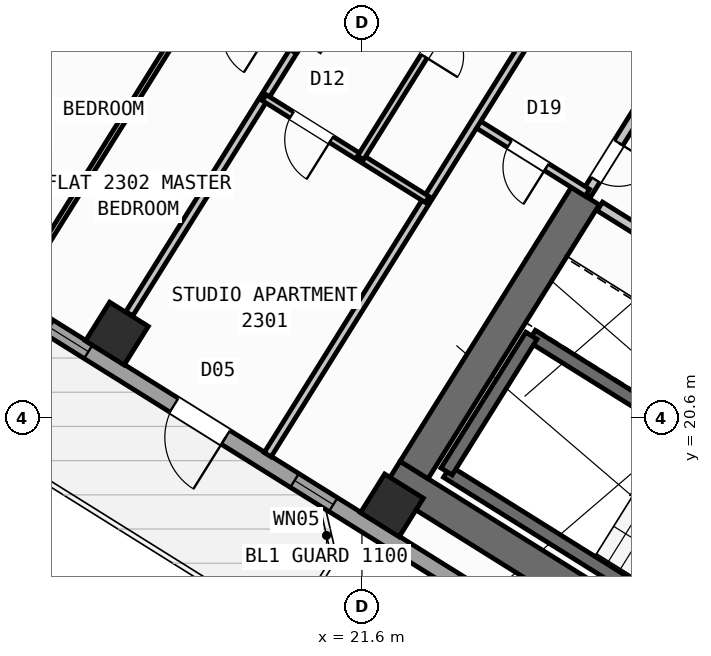
"""IFC4 building model, lengths in metres.
Left out: names, types, materials, properties, quantities, classifications, styles, units other than length and angle.
Written with IfcOpenShell. Run it as: python <this file> out.ifc"""

import sys

from ifc_helpers import new_model, si_unit, direction, frame, frame_2d, origin, origin_2d, place, context, subcontext, project, spatial, rectangle, hollow_rectangle, extrude, source, transform, mapped, element, fill, save


model = new_model("IFC4")
c1 = context("Model", 3, precision=1e-05, world=origin(), true_north=direction((0.0, 1.0)))
c2 = subcontext(c1, "Body", "Model", "MODEL_VIEW")
j1 = project(units=[si_unit("LENGTHUNIT", "METRE"), si_unit("PLANEANGLEUNIT", "RADIAN")], contexts=[c1])
p1 = place(None, origin())
s1 = spatial("IfcSite", under=j1, at=p1, CompositionType="ELEMENT")
p2 = place(p1, origin())
s2 = spatial("IfcBuilding", under=s1, at=p2, CompositionType="ELEMENT")
p3 = place(p2, frame((0.0, 0.0, 93.6)))
s3 = spatial("IfcBuildingStorey", under=s2, at=p3, CompositionType="ELEMENT", Elevation=93.6)
p4 = place(p3, frame((33.409, 12.45, 0.0), z_axis=(0.0, 0.0, 1.0), x_axis=(-0.848051132073, 0.529914405721, 0.0)))
e1 = element("IfcWall", 1, at=p4, inside=s3, PredefinedType="SHEAR", context=c2, shape_type="SweptSolid", body=[
    extrude(rectangle(XDim=13.24, YDim=0.65, at=frame_2d((6.62, 0.0))), origin(), (0.0, 0.0, 1.0), 3.35),
])
p5 = place(p3, frame((26.007, 24.976, 0.0), z_axis=(0.0, 0.0, 1.0), x_axis=(-0.529916319127, -0.848049936456, 0.0)))
e2 = element("IfcWall", 2, at=p5, inside=s3, PredefinedType="SHEAR", context=c2, shape_type="SweptSolid", body=[
    extrude(rectangle(XDim=6.375, YDim=0.65, at=frame_2d((3.188, 0.0))), origin(), (0.0, 0.0, 1.0), 3.35),
])
m1 = source(origin(), c2, "Body", "SweptSolid", [
    extrude(hollow_rectangle(XDim=0.9, YDim=0.9, WallThickness=0.036, at=origin_2d()), origin(), (0.0, 0.0, 1.0), 3.6),
])
for number, where, z_axis, x_axis in (
    (3, (22.191, 18.87, 0.0), (0.0, 0.0, 1.0), (-0.848, 0.53, 0.0)),
    (4, (16.764, 22.261, 0.0), (0.0, 0.0, 1.0), (-0.848, 0.53, 0.0)),
):
    element("IfcColumn", number, at=place(p3, frame(where, z_axis=z_axis, x_axis=x_axis)), inside=s3, PredefinedType="COLUMN", context=c2, shape_type="MappedRepresentation", body=[
        mapped(m1, transform((0.0, 0.0, 0.0), scale=1.0)),
    ])
p6 = place(p3, frame((31.76, 12.183, 0.0), z_axis=(0.0, 0.0, 1.0), x_axis=(-0.848047074256, 0.529920899612, 0.0)))
e5 = element("IfcWall", 5, at=p6, inside=s3, PredefinedType="STANDARD", context=c2, shape_type="SweptSolid", body=[
    extrude(rectangle(XDim=30.652, YDim=0.32, at=frame_2d((15.326, 0.0))), origin(), (0.0, 0.0, 1.0), 3.35),
])
p7 = place(p6, frame((15.153, 0.0, 0.0)))
e6 = element("IfcOpeningElement", 6, at=p7, cuts=e5, PredefinedType="OPENING", context=c2, shape_type="SweptSolid", body=[
    extrude(rectangle(XDim=1.2, YDim=2.15, at=frame_2d((0.6, 1.075))), frame((0.0, 0.17, 0.0), z_axis=(0.0, -1.0, 0.0), x_axis=(1.0, 0.0, 0.0)), (0.0, 0.0, 1.0), 0.34),
])
p8 = place(p6, frame((2.002, 0.0, 0.8)))
e7 = element("IfcOpeningElement", 7, at=p8, cuts=e5, PredefinedType="OPENING", context=c2, shape_type="SweptSolid", body=[
    extrude(rectangle(XDim=2.1, YDim=1.55, at=frame_2d((1.05, 0.775))), frame((0.0, 0.17, 0.0), z_axis=(0.0, -1.0, 0.0), x_axis=(1.0, 0.0, 0.0)), (0.0, 0.0, 1.0), 0.34),
])
p9 = place(p6, frame((7.206, 0.0, 0.8)))
e8 = element("IfcOpeningElement", 8, at=p9, cuts=e5, PredefinedType="OPENING", context=c2, shape_type="SweptSolid", body=[
    extrude(rectangle(XDim=2.1, YDim=1.55, at=frame_2d((1.05, 0.775))), frame((0.0, 0.17, 0.0), z_axis=(0.0, -1.0, 0.0), x_axis=(1.0, 0.0, 0.0)), (0.0, 0.0, 1.0), 0.34),
])
p10 = place(p6, frame((12.648, 0.0, 1.0)))
e9 = element("IfcOpeningElement", 9, at=p10, cuts=e5, PredefinedType="OPENING", context=c2, shape_type="SweptSolid", body=[
    extrude(rectangle(XDim=0.9, YDim=1.25, at=frame_2d((0.45, 0.625))), frame((0.0, 0.17, 0.0), z_axis=(0.0, -1.0, 0.0), x_axis=(1.0, 0.0, 0.0)), (0.0, 0.0, 1.0), 0.34),
])
p11 = place(p6, frame((27.974, 0.0, 0.95)))
e10 = element("IfcOpeningElement", 10, at=p11, cuts=e5, PredefinedType="OPENING", context=c2, shape_type="SweptSolid", body=[
    extrude(rectangle(XDim=1.2, YDim=1.4, at=frame_2d((0.6, 0.7))), frame((0.0, 0.17, 0.0), z_axis=(0.0, -1.0, 0.0), x_axis=(1.0, 0.0, 0.0)), (0.0, 0.0, 1.0), 0.34),
])
p12 = place(p6, frame((18.347, 0.0, 1.0)))
e11 = element("IfcOpeningElement", 11, at=p12, cuts=e5, PredefinedType="OPENING", context=c2, shape_type="SweptSolid", body=[
    extrude(rectangle(XDim=0.9, YDim=1.25, at=frame_2d((0.45, 0.625))), frame((0.0, 0.17, 0.0), z_axis=(0.0, -1.0, 0.0), x_axis=(1.0, 0.0, 0.0)), (0.0, 0.0, 1.0), 0.34),
])
p13 = place(p6, frame((20.931, 0.0, 1.0)))
e12 = element("IfcOpeningElement", 12, at=p13, cuts=e5, PredefinedType="OPENING", context=c2, shape_type="SweptSolid", body=[
    extrude(rectangle(XDim=0.65, YDim=1.15, at=frame_2d((0.325, 0.575))), frame((0.0, 0.17, 0.0), z_axis=(0.0, -1.0, 0.0), x_axis=(1.0, 0.0, 0.0)), (0.0, 0.0, 1.0), 0.34),
])
p14 = place(p6, frame((22.938, 0.0, 1.0)))
e13 = element("IfcOpeningElement", 13, at=p14, cuts=e5, PredefinedType="OPENING", context=c2, shape_type="SweptSolid", body=[
    extrude(rectangle(XDim=0.9, YDim=1.25, at=frame_2d((0.45, 0.625))), frame((0.0, 0.17, 0.0), z_axis=(0.0, -1.0, 0.0), x_axis=(1.0, 0.0, 0.0)), (0.0, 0.0, 1.0), 0.34),
])
p15 = place(p6, frame((25.069, 0.0, 1.0)))
e14 = element("IfcOpeningElement", 14, at=p15, cuts=e5, PredefinedType="OPENING", context=c2, shape_type="SweptSolid", body=[
    extrude(rectangle(XDim=0.9, YDim=1.25, at=frame_2d((0.45, 0.625))), frame((0.0, 0.17, 0.0), z_axis=(0.0, -1.0, 0.0), x_axis=(1.0, 0.0, 0.0)), (0.0, 0.0, 1.0), 0.34),
])
p16 = place(p3, frame((29.605, 15.581, 0.0), z_axis=(0.0, 0.0, 1.0), x_axis=(-0.848036911448, 0.529937163087, 0.0)))
e15 = element("IfcWall", 15, at=p16, inside=s3, PredefinedType="SHEAR", context=c2, shape_type="SweptSolid", body=[
    extrude(rectangle(XDim=7.46, YDim=0.26, at=frame_2d((3.73, 0.0))), origin(), (0.0, 0.0, 1.0), 3.35),
])
p17 = place(p3, frame((31.28, 18.261, 0.0), z_axis=(0.0, 0.0, 1.0), x_axis=(-0.848051618787, 0.529913626805, 0.0)))
e16 = element("IfcWall", 16, at=p17, inside=s3, PredefinedType="SHEAR", context=c2, shape_type="SweptSolid", body=[
    extrude(rectangle(XDim=7.46, YDim=0.26, at=frame_2d((3.73, 0.0))), origin(), (0.0, 0.0, 1.0), 3.35),
])
p18 = place(p17, frame((0.36, 0.0, 0.0)))
e17 = element("IfcOpeningElement", 17, at=p18, cuts=e16, PredefinedType="OPENING", context=c2, shape_type="SweptSolid", body=[
    extrude(rectangle(XDim=0.86, YDim=2.05, at=frame_2d((0.43, 1.025))), frame((0.0, 0.14, 0.0), z_axis=(0.0, -1.0, 0.0), x_axis=(1.0, 0.0, 0.0)), (0.0, 0.0, 1.0), 0.28),
])
p19 = place(p3, frame((24.945, 22.22, 0.0), z_axis=(0.0, 0.0, 1.0), x_axis=(-0.529908658664, -0.84805472316, 0.0)))
e18 = element("IfcWall", 18, at=p19, inside=s3, PredefinedType="SHEAR", context=c2, shape_type="SweptSolid", body=[
    extrude(rectangle(XDim=3.16, YDim=0.26, at=frame_2d((1.58, 0.0))), origin(), (0.0, 0.0, 1.0), 3.35),
])
p20 = place(p3, frame((31.525, 21.504, 0.0), z_axis=(0.0, 0.0, 1.0), x_axis=(-0.848044998614, 0.529924221305, 0.0)))
e19 = element("IfcWall", 19, at=p20, inside=s3, PredefinedType="STANDARD", context=c2, shape_type="SweptSolid", body=[
    extrude(rectangle(XDim=6.168, YDim=0.2, at=frame_2d((3.084, 0.0))), origin(), (0.0, 0.0, 1.0), 3.34),
])
p21 = place(p20, frame((4.4, 0.0, 0.0)))
e20 = element("IfcOpeningElement", 20, at=p21, cuts=e19, PredefinedType="OPENING", context=c2, shape_type="SweptSolid", body=[
    extrude(rectangle(XDim=0.86, YDim=2.05, at=frame_2d((0.43, 1.025))), frame((0.0, 0.11, 0.0), z_axis=(0.0, -1.0, 0.0), x_axis=(1.0, 0.0, 0.0)), (0.0, 0.0, 1.0), 0.22),
])
p22 = place(p20, frame((0.35, 0.0, 0.0)))
e21 = element("IfcOpeningElement", 21, at=p22, cuts=e19, PredefinedType="OPENING", context=c2, shape_type="SweptSolid", body=[
    extrude(rectangle(XDim=0.86, YDim=2.05, at=frame_2d((0.43, 1.025))), frame((0.0, 0.11, 0.0), z_axis=(0.0, -1.0, 0.0), x_axis=(1.0, 0.0, 0.0)), (0.0, 0.0, 1.0), 0.22),
])
p23 = place(p3, frame((27.596, 27.52, 0.0), z_axis=(0.0, 0.0, 1.0), x_axis=(-0.529865479138, -0.848081702443, 0.0)))
e22 = element("IfcWall", 22, at=p23, inside=s3, PredefinedType="STANDARD", context=c2, shape_type="SweptSolid", body=[
    extrude(rectangle(XDim=2.96, YDim=0.2, at=frame_2d((1.48, 0.0))), origin(), (0.0, 0.0, 1.0), 3.34),
])
p24 = place(p23, frame((1.76, 0.0, 0.0)))
e23 = element("IfcOpeningElement", 23, at=p24, cuts=e22, PredefinedType="OPENING", context=c2, shape_type="SweptSolid", body=[
    extrude(rectangle(XDim=0.86, YDim=2.05, at=frame_2d((0.43, 1.025))), frame((0.0, 0.11, 0.0), z_axis=(0.0, -1.0, 0.0), x_axis=(1.0, 0.0, 0.0)), (0.0, 0.0, 1.0), 0.22),
])
p25 = place(p3, frame((26.049, 25.044, 0.0), z_axis=(0.0, 0.0, 1.0), x_axis=(-0.848050851465, 0.529914854792, 0.0)))
e24 = element("IfcWall", 24, at=p25, inside=s3, PredefinedType="PARTITIONING", context=c2, shape_type="SweptSolid", body=[
    extrude(rectangle(XDim=2.61, YDim=0.16, at=frame_2d((1.305, 0.0))), origin(), (0.0, 0.0, 1.0), 2.775),
])
p26 = place(p25, frame((0.95, 0.0, 0.0)))
e25 = element("IfcOpeningElement", 25, at=p26, cuts=e24, PredefinedType="OPENING", context=c2, shape_type="SweptSolid", body=[
    extrude(rectangle(XDim=0.86, YDim=2.05, at=frame_2d((0.43, 1.025))), frame((0.0, 0.09, 0.0), z_axis=(0.0, -1.0, 0.0), x_axis=(1.0, 0.0, 0.0)), (0.0, 0.0, 1.0), 0.18),
])
p27 = place(p3, frame((25.807, 29.582, 0.0), z_axis=(0.0, 0.0, 1.0), x_axis=(-0.529920357077, -0.848047413271, 0.0)))
e26 = element("IfcWall", 26, at=p27, inside=s3, PredefinedType="PARTITIONING", context=c2, shape_type="SweptSolid", body=[
    extrude(rectangle(XDim=11.45, YDim=0.16, at=frame_2d((5.725, 0.0))), origin(), (0.0, 0.0, 1.0), 3.34),
])
p28 = place(p3, frame((20.387, 28.06, 0.0), z_axis=(0.0, 0.0, 1.0), x_axis=(-0.529902564924, -0.848058530814, 0.0)))
e27 = element("IfcWall", 27, at=p28, inside=s3, PredefinedType="PARTITIONING", context=c2, shape_type="SweptSolid", body=[
    extrude(rectangle(XDim=6.376, YDim=0.16, at=frame_2d((3.188, 0.0))), origin(), (0.0, 0.0, 1.0), 2.775),
])
p29 = place(p3, frame((22.887, 24.909, 0.0), z_axis=(0.0, 0.0, 1.0), x_axis=(-0.84803087207, 0.529946827537, 0.0)))
e28 = element("IfcWall", 28, at=p29, inside=s3, PredefinedType="PLUMBINGWALL", context=c2, shape_type="SweptSolid", body=[
    extrude(rectangle(XDim=3.79, YDim=0.14, at=frame_2d((1.895, 0.0))), origin(), (0.0, 0.0, 1.0), 3.34),
])
p30 = place(p29, frame((2.23, 0.0, 0.0)))
e29 = element("IfcOpeningElement", 29, at=p30, cuts=e28, PredefinedType="OPENING", context=c2, shape_type="SweptSolid", body=[
    extrude(rectangle(XDim=0.92, YDim=2.08, at=frame_2d((0.46, 1.04))), frame((0.0, 0.08, 0.0), z_axis=(0.0, -1.0, 0.0), x_axis=(1.0, 0.0, 0.0)), (0.0, 0.0, 1.0), 0.16),
])
p31 = place(p3, frame((24.492, 30.403, 0.0), z_axis=(0.0, 0.0, 1.0), x_axis=(-0.529919283494, -0.848048084121, 0.0)))
e30 = element("IfcWall", 30, at=p31, inside=s3, PredefinedType="PLUMBINGWALL", context=c2, shape_type="SweptSolid", body=[
    extrude(rectangle(XDim=5.51, YDim=0.14, at=frame_2d((2.755, 0.0))), origin(), (0.0, 0.0, 1.0), 2.995),
])
p32 = place(p31, frame((2.365, 0.0, 0.0)))
e31 = element("IfcOpeningElement", 31, at=p32, cuts=e30, PredefinedType="OPENING", context=c2, shape_type="SweptSolid", body=[
    extrude(rectangle(XDim=0.78, YDim=2.05, at=frame_2d((0.39, 1.025))), frame((0.0, 0.08, 0.0), z_axis=(0.0, -1.0, 0.0), x_axis=(1.0, 0.0, 0.0)), (0.0, 0.0, 1.0), 0.16),
])
for number, where, z_axis, x_axis in (
    (32, (18.464, 29.005, 0.0), (0.0, 0.0, 1.0), (-0.53, -0.848, 0.0)),
    (33, (16.656, 30.135, 0.0), (0.0, 0.0, 1.0), (-0.53, -0.848, 0.0)),
):
    element("IfcWall", number, at=place(p3, frame(where, z_axis=z_axis, x_axis=x_axis)), inside=s3, PredefinedType="PARTITIONING", context=c2, shape_type="SweptSolid", body=[
        extrude(rectangle(XDim=7.34, YDim=0.11, at=frame_2d((3.67, 0.0))), origin(), (0.0, 0.0, 1.0), 2.995),
    ])
m2 = source(origin(), c2, "Body", "SweptSolid", [
    extrude(rectangle(XDim=1.2, YDim=2.15, at=frame_2d((0.6, 1.075))), frame((0.0, 0.025, 0.0), z_axis=(0.0, -1.0, 0.0), x_axis=(1.0, 0.0, 0.0)), (0.0, 0.0, 1.0), 0.05),
])
p33 = place(p7, origin())
e34 = element("IfcDoor", 34, at=p33, inside=s3, OperationType="SINGLE_SWING_LEFT", PredefinedType="DOOR", context=c2, shape_type="MappedRepresentation", body=[
    mapped(m2, transform((0.0, 0.0, 0.0), scale=1.0)),
])
fill(e6, e34)
m3 = source(origin(), c2, "Body", "SweptSolid", [
    extrude(rectangle(XDim=0.9, YDim=1.25, at=frame_2d((0.45, 0.625))), frame((0.0, 0.03, 0.0), z_axis=(0.0, -1.0, 0.0), x_axis=(1.0, 0.0, 0.0)), (0.0, 0.0, 1.0), 0.06),
])
p34 = place(p10, origin())
e35 = element("IfcWindow", 35, at=p34, inside=s3, PartitioningType="SINGLE_PANEL", PredefinedType="WINDOW", context=c2, shape_type="MappedRepresentation", body=[
    mapped(m3, transform((0.0, 0.0, 0.0), scale=1.0)),
])
fill(e9, e35)
p35 = place(p12, origin())
e36 = element("IfcWindow", 36, at=p35, inside=s3, PartitioningType="SINGLE_PANEL", PredefinedType="WINDOW", context=c2, shape_type="MappedRepresentation", body=[
    mapped(m3, transform((0.0, 0.0, 0.0), scale=1.0)),
])
fill(e11, e36)
m4 = source(origin(), c2, "Body", "SweptSolid", [
    extrude(rectangle(XDim=0.86, YDim=2.05, at=frame_2d((0.43, 1.025))), frame((0.0, 0.025, 0.0), z_axis=(0.0, -1.0, 0.0), x_axis=(1.0, 0.0, 0.0)), (0.0, 0.0, 1.0), 0.05),
])
p36 = place(p26, origin())
e37 = element("IfcDoor", 37, at=p36, inside=s3, OperationType="SINGLE_SWING_LEFT", PredefinedType="DOOR", context=c2, shape_type="MappedRepresentation", body=[
    mapped(m4, transform((0.0, 0.0, 0.0), scale=1.0)),
])
fill(e25, e37)
p37 = place(p24, origin())
e38 = element("IfcDoor", 38, at=p37, inside=s3, OperationType="SINGLE_SWING_LEFT", PredefinedType="DOOR", context=c2, shape_type="MappedRepresentation", body=[
    mapped(m4, transform((0.0, 0.0, 0.0), scale=1.0)),
])
fill(e23, e38)
m5 = source(origin(), c2, "Body", "SweptSolid", [
    extrude(rectangle(XDim=0.92, YDim=2.08, at=frame_2d((0.46, 1.04))), frame((0.0, 0.025, 0.0), z_axis=(0.0, -1.0, 0.0), x_axis=(1.0, 0.0, 0.0)), (0.0, 0.0, 1.0), 0.05),
])
p38 = place(p30, origin())
e39 = element("IfcDoor", 39, at=p38, inside=s3, OperationType="SINGLE_SWING_LEFT", PredefinedType="DOOR", context=c2, shape_type="MappedRepresentation", body=[
    mapped(m5, transform((0.0, 0.0, 0.0), scale=1.0)),
])
fill(e29, e39)
m6 = source(origin(), c2, "Body", "SweptSolid", [
    extrude(rectangle(XDim=0.78, YDim=2.05, at=frame_2d((0.39, 1.025))), frame((0.0, 0.025, 0.0), z_axis=(0.0, -1.0, 0.0), x_axis=(1.0, 0.0, 0.0)), (0.0, 0.0, 1.0), 0.05),
])
p39 = place(p32, origin())
e40 = element("IfcDoor", 40, at=p39, inside=s3, OperationType="SINGLE_SWING_RIGHT", PredefinedType="DOOR", context=c2, shape_type="MappedRepresentation", body=[
    mapped(m6, transform((0.0, 0.0, 0.0), scale=1.0)),
])
fill(e31, e40)
save(model, sys.argv[1])
